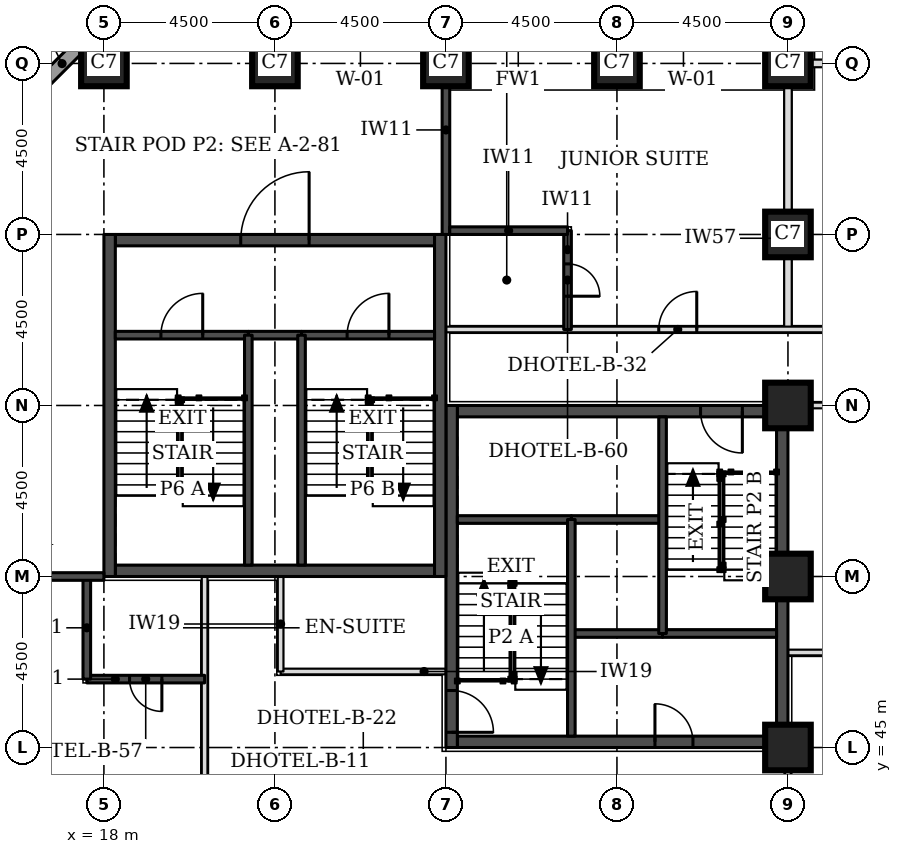
"""IFC4 building model, lengths in metres.
Left out: names, types, materials, properties, quantities, classifications, styles, units other than length and angle.
Written with IfcOpenShell. Run it as: python <this file> out.ifc"""

import sys

from ifc_helpers import new_model, si_unit, direction, frame, frame_2d, origin, origin_2d, place, context, subcontext, project, spatial, rectangle, extrude, element, fill, save


model = new_model("IFC4")
c1 = context("Model", 3, precision=1e-05, world=origin(), true_north=direction((0.0, 1.0)))
c2 = subcontext(c1, "Body", "Model", "MODEL_VIEW")
j1 = project(units=[si_unit("LENGTHUNIT", "METRE"), si_unit("PLANEANGLEUNIT", "RADIAN")], contexts=[c1])
p1 = place(None, origin())
s1 = spatial("IfcSite", under=j1, at=p1, CompositionType="ELEMENT")
p2 = place(p1, origin())
s2 = spatial("IfcBuilding", under=s1, at=p2, CompositionType="ELEMENT")
p3 = place(p2, frame((0.0, 0.0, 52.8)))
s3 = spatial("IfcBuildingStorey", under=s2, at=p3, CompositionType="ELEMENT", Elevation=52.8)
for number, where, z_axis, x_axis in (
    (1, (36.0, 45.0, 0.0), (0.0, 0.0, 1.0), (1.0, 0.0, 0.0)),
    (2, (36.0, 49.5, 0.0), (0.0, 0.0, 1.0), (1.0, 0.0, 0.0)),
    (3, (36.0, 54.0, 0.0), (0.0, 0.0, 1.0), (1.0, 0.0, 0.0)),
    (4, (36.0, 58.5, 0.0), (0.0, 0.0, 1.0), (1.0, 0.0, 0.0)),
    (5, (18.0, 63.0, 0.0), (0.0, 0.0, 1.0), (1.0, 0.0, 0.0)),
    (6, (22.5, 63.0, 0.0), (0.0, 0.0, 1.0), (1.0, 0.0, 0.0)),
    (7, (27.0, 63.0, 0.0), (0.0, 0.0, 1.0), (1.0, 0.0, 0.0)),
    (8, (31.5, 63.0, 0.0), (0.0, 0.0, 1.0), (1.0, 0.0, 0.0)),
    (9, (36.0, 63.0, 0.0), (0.0, 0.0, 1.0), (1.0, 0.0, 0.0)),
):
    element("IfcColumn", number, at=place(p3, frame(where, z_axis=z_axis, x_axis=x_axis)), inside=s3, PredefinedType="COLUMN", context=c2, shape_type="SweptSolid", body=[
        extrude(rectangle(XDim=1.2, YDim=1.2, at=origin_2d()), origin(), (0.0, 0.0, 1.0), 3.3),
    ])
p4 = place(p3, frame((27.3, 45.15, 0.0), z_axis=(0.0, 0.0, 1.0), x_axis=(1.0, 0.0, 0.0)))
e10 = element("IfcWall", 10, at=p4, inside=s3, PredefinedType="SHEAR", context=c2, shape_type="SweptSolid", body=[
    extrude(rectangle(XDim=8.4, YDim=0.3, at=frame_2d((4.2, 0.0))), origin(), (0.0, 0.0, 1.0), 3.3),
])
p5 = place(p4, frame((5.2, 0.0, 0.0)))
e11 = element("IfcOpeningElement", 11, at=p5, cuts=e10, PredefinedType="OPENING", context=c2, shape_type="SweptSolid", body=[
    extrude(rectangle(XDim=1.0, YDim=2.1, at=frame_2d((0.5, 1.05))), frame((0.0, 0.16, 0.0), z_axis=(0.0, -1.0, 0.0), x_axis=(1.0, 0.0, 0.0)), (0.0, 0.0, 1.0), 0.32),
])
p6 = place(p3, frame((27.3, 53.85, 0.0), z_axis=(0.0, 0.0, 1.0), x_axis=(1.0, 0.0, 0.0)))
e12 = element("IfcWall", 12, at=p6, inside=s3, PredefinedType="SHEAR", context=c2, shape_type="SweptSolid", body=[
    extrude(rectangle(XDim=8.4, YDim=0.3, at=frame_2d((4.2, 0.0))), origin(), (0.0, 0.0, 1.0), 3.3),
])
p7 = place(p6, frame((6.4, 0.0, 0.0)))
e13 = element("IfcOpeningElement", 13, at=p7, cuts=e12, PredefinedType="OPENING", context=c2, shape_type="SweptSolid", body=[
    extrude(rectangle(XDim=1.1, YDim=2.1, at=frame_2d((0.55, 1.05))), frame((0.0, 0.16, 0.0), z_axis=(0.0, -1.0, 0.0), x_axis=(1.0, 0.0, 0.0)), (0.0, 0.0, 1.0), 0.32),
])
p8 = place(p3, frame((27.15, 45.0, 0.0), z_axis=(0.0, 0.0, 1.0), x_axis=(0.0, 1.0, 0.0)))
e14 = element("IfcWall", 14, at=p8, inside=s3, PredefinedType="SHEAR", context=c2, shape_type="SweptSolid", body=[
    extrude(rectangle(XDim=9.0, YDim=0.3, at=frame_2d((4.5, 0.0))), origin(), (0.0, 0.0, 1.0), 3.3),
])
p9 = place(p8, frame((0.4, 0.0, 0.0)))
e15 = element("IfcOpeningElement", 15, at=p9, cuts=e14, PredefinedType="OPENING", context=c2, shape_type="SweptSolid", body=[
    extrude(rectangle(XDim=1.1, YDim=2.1, at=frame_2d((0.55, 1.05))), frame((0.0, 0.16, 0.0), z_axis=(0.0, -1.0, 0.0), x_axis=(1.0, 0.0, 0.0)), (0.0, 0.0, 1.0), 0.32),
])
p10 = place(p3, frame((35.85, 45.0, 0.0), z_axis=(0.0, 0.0, 1.0), x_axis=(0.0, 1.0, 0.0)))
e16 = element("IfcWall", 16, at=p10, inside=s3, PredefinedType="SHEAR", context=c2, shape_type="SweptSolid", body=[
    extrude(rectangle(XDim=9.0, YDim=0.3, at=frame_2d((4.5, 0.0))), origin(), (0.0, 0.0, 1.0), 3.3),
])
p11 = place(p3, frame((18.3, 49.65, 0.0), z_axis=(0.0, 0.0, 1.0), x_axis=(1.0, 0.0, 0.0)))
e17 = element("IfcWall", 17, at=p11, inside=s3, PredefinedType="SHEAR", context=c2, shape_type="SweptSolid", body=[
    extrude(rectangle(XDim=8.4, YDim=0.3, at=frame_2d((4.2, 0.0))), origin(), (0.0, 0.0, 1.0), 3.3),
])
p12 = place(p3, frame((18.3, 58.35, 0.0), z_axis=(0.0, 0.0, 1.0), x_axis=(1.0, 0.0, 0.0)))
e18 = element("IfcWall", 18, at=p12, inside=s3, PredefinedType="SHEAR", context=c2, shape_type="SweptSolid", body=[
    extrude(rectangle(XDim=8.4, YDim=0.3, at=frame_2d((4.2, 0.0))), origin(), (0.0, 0.0, 1.0), 3.3),
])
p13 = place(p12, frame((3.3, 0.0, 0.0)))
e19 = element("IfcOpeningElement", 19, at=p13, cuts=e18, PredefinedType="OPENING", context=c2, shape_type="SweptSolid", body=[
    extrude(rectangle(XDim=1.8, YDim=2.1, at=frame_2d((0.9, 1.05))), frame((0.0, 0.16, 0.0), z_axis=(0.0, -1.0, 0.0), x_axis=(1.0, 0.0, 0.0)), (0.0, 0.0, 1.0), 0.32),
])
for number, where, z_axis, x_axis in (
    (20, (18.15, 49.5, 0.0), (0.0, 0.0, 1.0), (0.0, 1.0, 0.0)),
    (21, (26.85, 49.5, 0.0), (0.0, 0.0, 1.0), (0.0, 1.0, 0.0)),
):
    element("IfcWall", number, at=place(p3, frame(where, z_axis=z_axis, x_axis=x_axis)), inside=s3, PredefinedType="SHEAR", context=c2, shape_type="SweptSolid", body=[
        extrude(rectangle(XDim=9.0, YDim=0.3, at=frame_2d((4.5, 0.0))), origin(), (0.0, 0.0, 1.0), 3.3),
    ])
p14 = place(p3, frame((17.73, 63.826, 0.0), z_axis=(0.0, 0.0, 1.0), x_axis=(-0.707106781187, -0.707106781187, 0.0)))
e22 = element("IfcWall", 22, at=p14, inside=s3, PredefinedType="STANDARD", context=c2, shape_type="SweptSolid", body=[
    extrude(rectangle(XDim=7.151, YDim=0.35, at=frame_2d((3.576, 0.0))), origin(), (0.0, 0.0, 1.0), 3.055),
])
p15 = place(p14, frame((1.926, 0.0, 0.8)))
e23 = element("IfcOpeningElement", 23, at=p15, cuts=e22, PredefinedType="OPENING", context=c2, shape_type="SweptSolid", body=[
    extrude(rectangle(XDim=3.3, YDim=1.5, at=frame_2d((1.65, 0.75))), frame((0.0, 0.185, 0.0), z_axis=(0.0, -1.0, 0.0), x_axis=(1.0, 0.0, 0.0)), (0.0, 0.0, 1.0), 0.37),
])
p16 = place(p3, frame((36.0, 56.0, 0.0), z_axis=(0.0, 0.0, 1.0), x_axis=(0.0, 1.0, 0.0)))
e24 = element("IfcWall", 24, at=p16, inside=s3, PredefinedType="PARTITIONING", context=c2, shape_type="SweptSolid", body=[
    extrude(rectangle(XDim=6.4, YDim=0.2, at=frame_2d((3.2, 0.0))), origin(), (0.0, 0.0, 1.0), 2.33),
])
p17 = place(p3, frame((36.6, 63.0, 0.0), z_axis=(0.0, 0.0, 1.0), x_axis=(1.0, 0.0, 0.0)))
e25 = element("IfcWall", 25, at=p17, inside=s3, PredefinedType="PARTITIONING", context=c2, shape_type="SweptSolid", body=[
    extrude(rectangle(XDim=6.4, YDim=0.2, at=frame_2d((3.2, 0.0))), origin(), (0.0, 0.0, 1.0), 3.08),
])
p18 = place(p3, frame((20.65, 23.65, 0.0), z_axis=(0.0, 0.0, 1.0), x_axis=(0.0, 1.0, 0.0)))
e26 = element("IfcWall", 26, at=p18, inside=s3, PredefinedType="PARTITIONING", context=c2, shape_type="SweptSolid", body=[
    extrude(rectangle(XDim=25.85, YDim=0.15, at=frame_2d((12.925, 0.0))), origin(), (0.0, 0.0, 1.0), 3.08),
])
p19 = place(p18, frame((1.5, 0.0, 0.0)))
e27 = element("IfcOpeningElement", 27, at=p19, cuts=e26, PredefinedType="OPENING", context=c2, shape_type="SweptSolid", body=[
    extrude(rectangle(XDim=1.0, YDim=2.1, at=frame_2d((0.5, 1.05))), frame((0.0, 0.085, 0.0), z_axis=(0.0, -1.0, 0.0), x_axis=(1.0, 0.0, 0.0)), (0.0, 0.0, 1.0), 0.17),
])
p20 = place(p18, frame((13.45, 0.0, 0.0)))
e28 = element("IfcOpeningElement", 28, at=p20, cuts=e26, PredefinedType="OPENING", context=c2, shape_type="SweptSolid", body=[
    extrude(rectangle(XDim=1.0, YDim=2.1, at=frame_2d((0.5, 1.05))), frame((0.0, 0.085, 0.0), z_axis=(0.0, -1.0, 0.0), x_axis=(1.0, 0.0, 0.0)), (0.0, 0.0, 1.0), 0.17),
])
p21 = place(p18, frame((19.5, 0.0, 0.0)))
e29 = element("IfcOpeningElement", 29, at=p21, cuts=e26, PredefinedType="OPENING", context=c2, shape_type="SweptSolid", body=[
    extrude(rectangle(XDim=1.0, YDim=2.1, at=frame_2d((0.5, 1.05))), frame((0.0, 0.085, 0.0), z_axis=(0.0, -1.0, 0.0), x_axis=(1.0, 0.0, 0.0)), (0.0, 0.0, 1.0), 0.17),
])
p22 = place(p3, frame((36.0, 40.55, 0.0), z_axis=(0.0, 0.0, 1.0), x_axis=(0.0, 1.0, 0.0)))
e30 = element("IfcWall", 30, at=p22, inside=s3, PredefinedType="PARTITIONING", context=c2, shape_type="SweptSolid", body=[
    extrude(rectangle(XDim=4.4, YDim=0.15, at=frame_2d((2.2, 0.0))), origin(), (0.0, 0.0, 1.0), 2.33),
])
p23 = place(p3, frame((22.65, 47.0, 0.0), z_axis=(0.0, 0.0, 1.0), x_axis=(1.0, 0.0, 0.0)))
e31 = element("IfcWall", 31, at=p23, inside=s3, PredefinedType="PARTITIONING", context=c2, shape_type="SweptSolid", body=[
    extrude(rectangle(XDim=4.35, YDim=0.15, at=frame_2d((2.175, 0.0))), origin(), (0.0, 0.0, 1.0), 3.08),
])
p24 = place(p3, frame((22.65, 47.0, 0.0), z_axis=(0.0, 0.0, 1.0), x_axis=(0.0, 1.0, 0.0)))
e32 = element("IfcWall", 32, at=p24, inside=s3, PredefinedType="PARTITIONING", context=c2, shape_type="SweptSolid", body=[
    extrude(rectangle(XDim=2.5, YDim=0.15, at=frame_2d((1.25, 0.0))), origin(), (0.0, 0.0, 1.0), 3.08),
])
p25 = place(p3, frame((36.05, 54.0, 0.0), z_axis=(0.0, 0.0, 1.0), x_axis=(1.0, 0.0, 0.0)))
e33 = element("IfcWall", 33, at=p25, inside=s3, PredefinedType="PARTITIONING", context=c2, shape_type="SweptSolid", body=[
    extrude(rectangle(XDim=6.95, YDim=0.15, at=frame_2d((3.475, 0.0))), origin(), (0.0, 0.0, 1.0), 3.08),
])
p26 = place(p3, frame((27.0, 56.0, 0.0), z_axis=(0.0, 0.0, 1.0), x_axis=(1.0, 0.0, 0.0)))
e34 = element("IfcWall", 34, at=p26, inside=s3, PredefinedType="PARTITIONING", context=c2, shape_type="SweptSolid", body=[
    extrude(rectangle(XDim=16.0, YDim=0.15, at=frame_2d((8.0, 0.0))), origin(), (0.0, 0.0, 1.0), 3.08),
])
p27 = place(p26, frame((5.6, 0.0, 0.0)))
e35 = element("IfcOpeningElement", 35, at=p27, cuts=e34, PredefinedType="OPENING", context=c2, shape_type="SweptSolid", body=[
    extrude(rectangle(XDim=1.0, YDim=2.1, at=frame_2d((0.5, 1.05))), frame((0.0, 0.085, 0.0), z_axis=(0.0, -1.0, 0.0), x_axis=(1.0, 0.0, 0.0)), (0.0, 0.0, 1.0), 0.17),
])
p28 = place(p3, frame((17.55, 46.8, 0.0), z_axis=(0.0, 0.0, 1.0), x_axis=(1.0, 0.0, 0.0)))
e36 = element("IfcWall", 36, at=p28, inside=s3, PredefinedType="SOLIDWALL", context=c2, shape_type="SweptSolid", body=[
    extrude(rectangle(XDim=3.1, YDim=0.2, at=frame_2d((1.55, 0.0))), origin(), (0.0, 0.0, 1.0), 3.08),
])
p29 = place(p28, frame((1.125, 0.0, 0.0)))
e37 = element("IfcOpeningElement", 37, at=p29, cuts=e36, PredefinedType="OPENING", context=c2, shape_type="SweptSolid", body=[
    extrude(rectangle(XDim=0.85, YDim=2.1, at=frame_2d((0.425, 1.05))), frame((0.0, 0.11, 0.0), z_axis=(0.0, -1.0, 0.0), x_axis=(1.0, 0.0, 0.0)), (0.0, 0.0, 1.0), 0.22),
])
p30 = place(p3, frame((17.55, 46.8, 0.0), z_axis=(0.0, 0.0, 1.0), x_axis=(0.0, 1.0, 0.0)))
e38 = element("IfcWall", 38, at=p30, inside=s3, PredefinedType="SOLIDWALL", context=c2, shape_type="SweptSolid", body=[
    extrude(rectangle(XDim=2.7, YDim=0.2, at=frame_2d((1.35, 0.0))), origin(), (0.0, 0.0, 1.0), 3.08),
])
for number, where, z_axis, x_axis in (
    (39, (14.1, 49.5, 0.0), (0.0, 0.0, 1.0), (1.0, 0.0, 0.0)),
    (40, (27.0, 58.5, 0.0), (0.0, 0.0, 1.0), (0.0, 1.0, 0.0)),
):
    element("IfcWall", number, at=place(p3, frame(where, z_axis=z_axis, x_axis=x_axis)), inside=s3, PredefinedType="SOLIDWALL", context=c2, shape_type="SweptSolid", body=[
        extrude(rectangle(XDim=3.9, YDim=0.2, at=frame_2d((1.95, 0.0))), origin(), (0.0, 0.0, 1.0), 3.08),
    ])
p31 = place(p3, frame((30.2, 56.0, 0.0), z_axis=(0.0, 0.0, 1.0), x_axis=(0.0, 1.0, 0.0)))
e41 = element("IfcWall", 41, at=p31, inside=s3, PredefinedType="SOLIDWALL", context=c2, shape_type="SweptSolid", body=[
    extrude(rectangle(XDim=2.6, YDim=0.2, at=frame_2d((1.3, 0.0))), origin(), (0.0, 0.0, 1.0), 3.08),
])
p32 = place(p31, frame((0.875, 0.0, 0.0)))
e42 = element("IfcOpeningElement", 42, at=p32, cuts=e41, PredefinedType="OPENING", context=c2, shape_type="SweptSolid", body=[
    extrude(rectangle(XDim=0.85, YDim=2.1, at=frame_2d((0.425, 1.05))), frame((0.0, 0.11, 0.0), z_axis=(0.0, -1.0, 0.0), x_axis=(1.0, 0.0, 0.0)), (0.0, 0.0, 1.0), 0.22),
])
p33 = place(p3, frame((27.1, 58.6, 0.0), z_axis=(0.0, 0.0, 1.0), x_axis=(1.0, 0.0, 0.0)))
e43 = element("IfcWall", 43, at=p33, inside=s3, PredefinedType="SOLIDWALL", context=c2, shape_type="SweptSolid", body=[
    extrude(rectangle(XDim=3.1, YDim=0.2, at=frame_2d((1.55, 0.0))), origin(), (0.0, 0.0, 1.0), 3.08),
])
p34 = place(p3, frame((36.0, 47.5, 0.0), z_axis=(0.0, 0.0, 1.0), x_axis=(1.0, 0.0, 0.0)))
e44 = element("IfcWall", 44, at=p34, inside=s3, PredefinedType="PARTITIONING", context=c2, shape_type="SweptSolid", body=[
    extrude(rectangle(XDim=7.0, YDim=0.15, at=frame_2d((3.5, 0.0))), origin(), (0.0, 0.0, 1.0), 3.08),
])
p35 = place(p3, frame((30.3, 48.0, 0.0), z_axis=(0.0, 0.0, 1.0), x_axis=(1.0, 0.0, 0.0)))
e45 = element("IfcWall", 45, at=p35, inside=s3, PredefinedType="SOLIDWALL", context=c2, shape_type="SweptSolid", body=[
    extrude(rectangle(XDim=2.4, YDim=0.2, at=frame_2d((1.2, 0.0))), origin(), (0.0, 0.0, 1.0), 3.08),
])
p36 = place(p3, frame((32.7, 48.0, 0.0), z_axis=(0.0, 0.0, 1.0), x_axis=(1.0, 0.0, 0.0)))
e46 = element("IfcWall", 46, at=p36, inside=s3, PredefinedType="SOLIDWALL", context=c2, shape_type="SweptSolid", body=[
    extrude(rectangle(XDim=3.0, YDim=0.2, at=frame_2d((1.5, 0.0))), origin(), (0.0, 0.0, 1.0), 3.08),
])
p37 = place(p3, frame((30.3, 51.0, 0.0), z_axis=(0.0, 0.0, 1.0), x_axis=(1.0, 0.0, 0.0)))
e47 = element("IfcWall", 47, at=p37, inside=s3, PredefinedType="SOLIDWALL", context=c2, shape_type="SweptSolid", body=[
    extrude(rectangle(XDim=2.4, YDim=0.2, at=frame_2d((1.2, 0.0))), origin(), (0.0, 0.0, 1.0), 3.3),
])
p38 = place(p3, frame((27.3, 51.0, 0.0), z_axis=(0.0, 0.0, 1.0), x_axis=(1.0, 0.0, 0.0)))
e48 = element("IfcWall", 48, at=p38, inside=s3, PredefinedType="SOLIDWALL", context=c2, shape_type="SweptSolid", body=[
    extrude(rectangle(XDim=3.0, YDim=0.2, at=frame_2d((1.5, 0.0))), origin(), (0.0, 0.0, 1.0), 3.08),
])
for number, where, z_axis, x_axis in (
    (49, (30.3, 45.3, 0.0), (0.0, 0.0, 1.0), (0.0, 1.0, 0.0)),
    (50, (32.7, 48.0, 0.0), (0.0, 0.0, 1.0), (0.0, 1.0, 0.0)),
):
    element("IfcWall", number, at=place(p3, frame(where, z_axis=z_axis, x_axis=x_axis)), inside=s3, PredefinedType="SOLIDWALL", context=c2, shape_type="SweptSolid", body=[
        extrude(rectangle(XDim=5.7, YDim=0.2, at=frame_2d((2.85, 0.0))), origin(), (0.0, 0.0, 1.0), 3.08),
    ])
p39 = place(p3, frame((21.8, 55.85, 0.0), z_axis=(0.0, 0.0, 1.0), x_axis=(1.0, 0.0, 0.0)))
e51 = element("IfcWall", 51, at=p39, inside=s3, PredefinedType="SOLIDWALL", context=c2, shape_type="SweptSolid", body=[
    extrude(rectangle(XDim=1.4, YDim=0.2, at=frame_2d((0.7, 0.0))), origin(), (0.0, 0.0, 1.0), 3.08),
])
p40 = place(p3, frame((18.3, 55.85, 0.0), z_axis=(0.0, 0.0, 1.0), x_axis=(1.0, 0.0, 0.0)))
e52 = element("IfcWall", 52, at=p40, inside=s3, PredefinedType="SOLIDWALL", context=c2, shape_type="SweptSolid", body=[
    extrude(rectangle(XDim=3.5, YDim=0.2, at=frame_2d((1.75, 0.0))), origin(), (0.0, 0.0, 1.0), 3.08),
])
p41 = place(p40, frame((1.2, 0.0, 0.0)))
e53 = element("IfcOpeningElement", 53, at=p41, cuts=e52, PredefinedType="OPENING", context=c2, shape_type="SweptSolid", body=[
    extrude(rectangle(XDim=1.1, YDim=2.1, at=frame_2d((0.55, 1.05))), frame((0.0, 0.11, 0.0), z_axis=(0.0, -1.0, 0.0), x_axis=(1.0, 0.0, 0.0)), (0.0, 0.0, 1.0), 0.22),
])
p42 = place(p3, frame((23.2, 55.85, 0.0), z_axis=(0.0, 0.0, 1.0), x_axis=(1.0, 0.0, 0.0)))
e54 = element("IfcWall", 54, at=p42, inside=s3, PredefinedType="SOLIDWALL", context=c2, shape_type="SweptSolid", body=[
    extrude(rectangle(XDim=3.5, YDim=0.2, at=frame_2d((1.75, 0.0))), origin(), (0.0, 0.0, 1.0), 3.08),
])
p43 = place(p42, frame((1.2, 0.0, 0.0)))
e55 = element("IfcOpeningElement", 55, at=p43, cuts=e54, PredefinedType="OPENING", context=c2, shape_type="SweptSolid", body=[
    extrude(rectangle(XDim=1.1, YDim=2.1, at=frame_2d((0.55, 1.05))), frame((0.0, 0.11, 0.0), z_axis=(0.0, -1.0, 0.0), x_axis=(1.0, 0.0, 0.0)), (0.0, 0.0, 1.0), 0.22),
])
for number, where, z_axis, x_axis in (
    (56, (21.8, 49.8, 0.0), (0.0, 0.0, 1.0), (0.0, 1.0, 0.0)),
    (57, (23.2, 49.8, 0.0), (0.0, 0.0, 1.0), (0.0, 1.0, 0.0)),
):
    element("IfcWall", number, at=place(p3, frame(where, z_axis=z_axis, x_axis=x_axis)), inside=s3, PredefinedType="SOLIDWALL", context=c2, shape_type="SweptSolid", body=[
        extrude(rectangle(XDim=6.05, YDim=0.2, at=frame_2d((3.025, 0.0))), origin(), (0.0, 0.0, 1.0), 3.08),
    ])
p44 = place(p29, frame((0.85, 0.0, 0.0), z_axis=(0.0, 0.0, 1.0), x_axis=(-1.0, 0.0, 0.0)))
e58 = element("IfcDoor", 58, at=p44, inside=s3, OperationType="SINGLE_SWING_LEFT", PredefinedType="DOOR", context=c2, shape_type="SweptSolid", body=[
    extrude(rectangle(XDim=0.85, YDim=2.1, at=frame_2d((0.425, 1.05))), frame((0.0, 0.025, 0.0), z_axis=(0.0, -1.0, 0.0), x_axis=(1.0, 0.0, 0.0)), (0.0, 0.0, 1.0), 0.05),
])
fill(e37, e58)
p45 = place(p27, origin())
e59 = element("IfcDoor", 59, at=p45, inside=s3, OperationType="SINGLE_SWING_RIGHT", PredefinedType="DOOR", context=c2, shape_type="SweptSolid", body=[
    extrude(rectangle(XDim=1.0, YDim=2.1, at=frame_2d((0.5, 1.05))), frame((0.0, 0.025, 0.0), z_axis=(0.0, -1.0, 0.0), x_axis=(1.0, 0.0, 0.0)), (0.0, 0.0, 1.0), 0.05),
])
fill(e35, e59)
p46 = place(p32, frame((0.85, 0.0, 0.0), z_axis=(0.0, 0.0, 1.0), x_axis=(-1.0, 0.0, 0.0)))
e60 = element("IfcDoor", 60, at=p46, inside=s3, OperationType="SINGLE_SWING_RIGHT", PredefinedType="DOOR", context=c2, shape_type="SweptSolid", body=[
    extrude(rectangle(XDim=0.85, YDim=2.1, at=frame_2d((0.425, 1.05))), frame((0.0, 0.025, 0.0), z_axis=(0.0, -1.0, 0.0), x_axis=(1.0, 0.0, 0.0)), (0.0, 0.0, 1.0), 0.05),
])
fill(e42, e60)
p47 = place(p9, frame((1.1, 0.0, 0.0), z_axis=(0.0, 0.0, 1.0), x_axis=(-1.0, 0.0, 0.0)))
e61 = element("IfcDoor", 61, at=p47, inside=s3, OperationType="SINGLE_SWING_RIGHT", PredefinedType="DOOR", context=c2, shape_type="SweptSolid", body=[
    extrude(rectangle(XDim=1.1, YDim=2.1, at=frame_2d((0.55, 1.05))), frame((0.0, 0.025, 0.0), z_axis=(0.0, -1.0, 0.0), x_axis=(1.0, 0.0, 0.0)), (0.0, 0.0, 1.0), 0.05),
])
fill(e15, e61)
p48 = place(p7, frame((1.1, 0.0, 0.0), z_axis=(0.0, 0.0, 1.0), x_axis=(-1.0, 0.0, 0.0)))
e62 = element("IfcDoor", 62, at=p48, inside=s3, OperationType="SINGLE_SWING_LEFT", PredefinedType="DOOR", context=c2, shape_type="SweptSolid", body=[
    extrude(rectangle(XDim=1.1, YDim=2.1, at=frame_2d((0.55, 1.05))), frame((0.0, 0.025, 0.0), z_axis=(0.0, -1.0, 0.0), x_axis=(1.0, 0.0, 0.0)), (0.0, 0.0, 1.0), 0.05),
])
fill(e13, e62)
p49 = place(p5, origin())
e63 = element("IfcDoor", 63, at=p49, inside=s3, OperationType="SINGLE_SWING_LEFT", PredefinedType="DOOR", context=c2, shape_type="SweptSolid", body=[
    extrude(rectangle(XDim=1.0, YDim=2.1, at=frame_2d((0.5, 1.05))), frame((0.0, 0.025, 0.0), z_axis=(0.0, -1.0, 0.0), x_axis=(1.0, 0.0, 0.0)), (0.0, 0.0, 1.0), 0.05),
])
fill(e11, e63)
p50 = place(p41, origin())
e64 = element("IfcDoor", 64, at=p50, inside=s3, OperationType="SINGLE_SWING_RIGHT", PredefinedType="DOOR", context=c2, shape_type="SweptSolid", body=[
    extrude(rectangle(XDim=1.1, YDim=2.1, at=frame_2d((0.55, 1.05))), frame((0.0, 0.025, 0.0), z_axis=(0.0, -1.0, 0.0), x_axis=(1.0, 0.0, 0.0)), (0.0, 0.0, 1.0), 0.05),
])
fill(e53, e64)
p51 = place(p43, origin())
e65 = element("IfcDoor", 65, at=p51, inside=s3, OperationType="SINGLE_SWING_RIGHT", PredefinedType="DOOR", context=c2, shape_type="SweptSolid", body=[
    extrude(rectangle(XDim=1.1, YDim=2.1, at=frame_2d((0.55, 1.05))), frame((0.0, 0.025, 0.0), z_axis=(0.0, -1.0, 0.0), x_axis=(1.0, 0.0, 0.0)), (0.0, 0.0, 1.0), 0.05),
])
fill(e55, e65)
p52 = place(p13, origin())
e66 = element("IfcDoor", 66, at=p52, inside=s3, OperationType="SINGLE_SWING_RIGHT", PredefinedType="DOOR", context=c2, shape_type="SweptSolid", body=[
    extrude(rectangle(XDim=1.8, YDim=2.1, at=frame_2d((0.9, 1.05))), frame((0.0, 0.025, 0.0), z_axis=(0.0, -1.0, 0.0), x_axis=(1.0, 0.0, 0.0)), (0.0, 0.0, 1.0), 0.05),
])
fill(e19, e66)
save(model, sys.argv[1])
